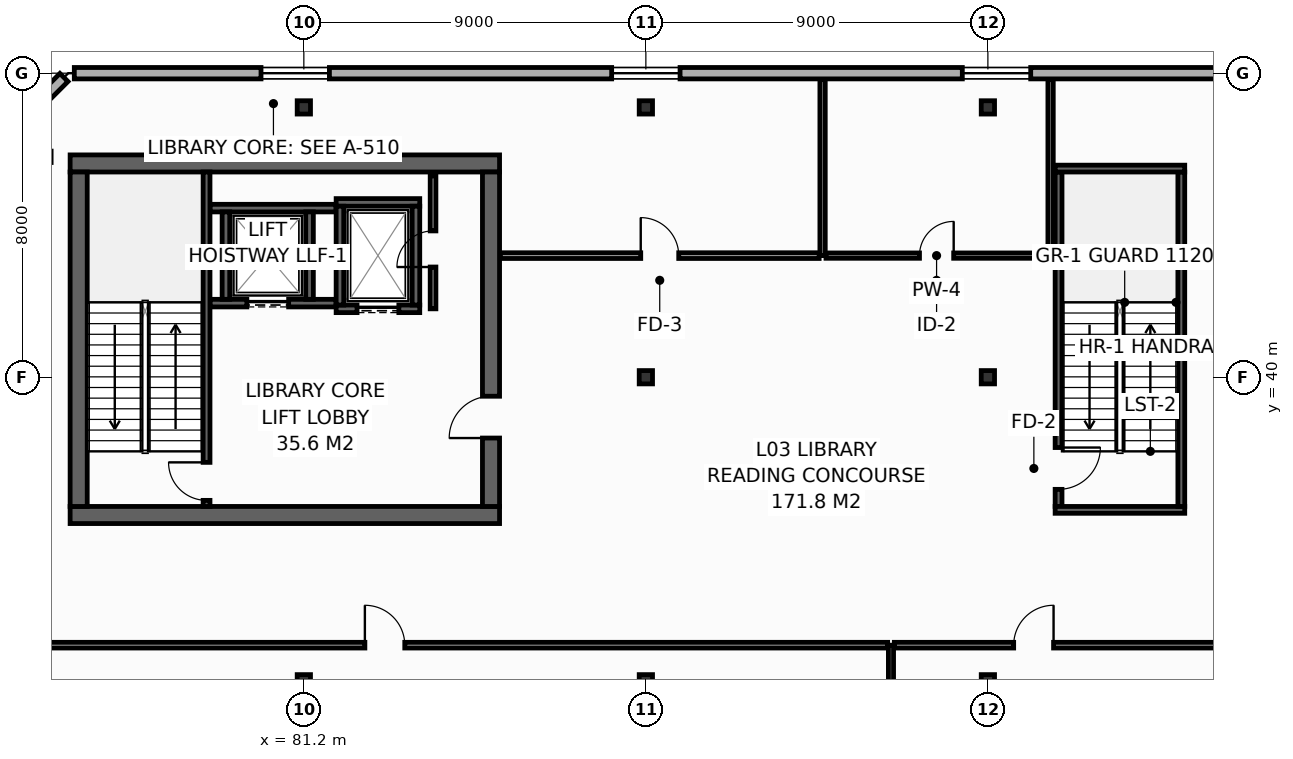
"""IFC4 building model, lengths in metres.
Left out: names, types, materials, properties, quantities, classifications, styles, units other than length and angle.
Written with IfcOpenShell. Run it as: python <this file> out.ifc"""

import sys

from ifc_helpers import new_model, si_unit, direction, frame, frame_2d, origin, origin_2d, place, context, subcontext, project, spatial, rectangle, i_section, extrude, element, fill, save


model = new_model("IFC4")
c1 = context("Model", 3, precision=1e-05, world=origin(), true_north=direction((0.0, 1.0)))
c2 = subcontext(c1, "Body", "Model", "MODEL_VIEW")
j1 = project(units=[si_unit("LENGTHUNIT", "METRE"), si_unit("PLANEANGLEUNIT", "RADIAN")], contexts=[c1])
p1 = place(None, origin())
s1 = spatial("IfcSite", under=j1, at=p1, CompositionType="ELEMENT")
p2 = place(p1, origin())
s2 = spatial("IfcBuilding", under=s1, at=p2, CompositionType="ELEMENT")
p3 = place(p2, frame((0.0, 0.0, 16.8)))
s3 = spatial("IfcBuildingStorey", under=s2, at=p3, CompositionType="ELEMENT", Elevation=16.8)
for number, where, z_axis, x_axis in (
    (1, (75.05, 36.375, 0.0), (0.0, 0.0, 1.0), (1.0, 0.0, 0.0)),
    (2, (75.05, 45.625, 0.0), (0.0, 0.0, 1.0), (1.0, 0.0, 0.0)),
):
    element("IfcWall", number, at=place(p3, frame(where, z_axis=z_axis, x_axis=x_axis)), inside=s3, PredefinedType="SHEAR", context=c2, shape_type="SweptSolid", body=[
        extrude(rectangle(XDim=11.3, YDim=0.45, at=frame_2d((5.65, 0.0))), origin(), (0.0, 0.0, 1.0), 5.1),
    ])
p4 = place(p3, frame((75.275, 36.6, 0.0), z_axis=(0.0, 0.0, 1.0), x_axis=(0.0, 1.0, 0.0)))
e3 = element("IfcWall", 3, at=p4, inside=s3, PredefinedType="SHEAR", context=c2, shape_type="SweptSolid", body=[
    extrude(rectangle(XDim=8.8, YDim=0.45, at=frame_2d((4.4, 0.0))), origin(), (0.0, 0.0, 1.0), 5.1),
])
p5 = place(p3, frame((86.125, 36.6, 0.0), z_axis=(0.0, 0.0, 1.0), x_axis=(0.0, 1.0, 0.0)))
e4 = element("IfcWall", 4, at=p5, inside=s3, PredefinedType="SHEAR", context=c2, shape_type="SweptSolid", body=[
    extrude(rectangle(XDim=8.8, YDim=0.45, at=frame_2d((4.4, 0.0))), origin(), (0.0, 0.0, 1.0), 5.1),
])
p6 = place(p5, frame((1.8, 0.0, 0.0)))
e5 = element("IfcOpeningElement", 5, at=p6, cuts=e4, PredefinedType="OPENING", context=c2, shape_type="SweptSolid", body=[
    extrude(rectangle(XDim=1.1, YDim=2.15, at=frame_2d((0.55, 1.075))), frame((0.0, 0.235, 0.0), z_axis=(0.0, -1.0, 0.0), x_axis=(1.0, 0.0, 0.0)), (0.0, 0.0, 1.0), 0.47),
])
for number, where, z_axis, x_axis in (
    (6, (81.2, 32.0, 0.0), (0.0, 0.0, 1.0), (1.0, 0.0, 0.0)),
    (7, (81.2, 47.1, 0.0), (0.0, 0.0, 1.0), (1.0, 0.0, 0.0)),
    (8, (90.2, 32.0, 0.0), (0.0, 0.0, 1.0), (1.0, 0.0, 0.0)),
    (9, (90.2, 40.0, 0.0), (0.0, 0.0, 1.0), (1.0, 0.0, 0.0)),
    (10, (90.2, 47.1, 0.0), (0.0, 0.0, 1.0), (1.0, 0.0, 0.0)),
    (11, (99.2, 32.0, 0.0), (0.0, 0.0, 1.0), (1.0, 0.0, 0.0)),
    (12, (99.2, 40.0, 0.0), (0.0, 0.0, 1.0), (1.0, 0.0, 0.0)),
    (13, (99.2, 47.1, 0.0), (0.0, 0.0, 1.0), (1.0, 0.0, 0.0)),
):
    element("IfcColumn", number, at=place(p3, frame(where, z_axis=z_axis, x_axis=x_axis)), inside=s3, PredefinedType="COLUMN", context=c2, shape_type="SweptSolid", body=[
        extrude(i_section(OverallWidth=0.35, OverallDepth=0.35, WebThickness=0.012, FlangeThickness=0.019, FilletRadius=0.02, at=origin_2d()), origin(), (0.0, 0.0, 1.0), 5.4),
    ])
p7 = place(p3, frame((78.73, 41.95, 0.0), z_axis=(0.0, 0.0, 1.0), x_axis=(1.0, 0.0, 0.0)))
e14 = element("IfcWall", 14, at=p7, inside=s3, PredefinedType="SHEAR", context=c2, shape_type="SweptSolid", body=[
    extrude(rectangle(XDim=3.32, YDim=0.2, at=frame_2d((1.66, 0.0))), origin(), (0.0, 0.0, 1.0), 5.1),
])
p8 = place(p7, frame((0.97, 0.0, 0.0)))
e15 = element("IfcOpeningElement", 15, at=p8, cuts=e14, PredefinedType="OPENING", context=c2, shape_type="SweptSolid", body=[
    extrude(rectangle(XDim=1.1, YDim=2.2, at=frame_2d((0.55, 1.1))), frame((0.0, 0.11, 0.0), z_axis=(0.0, -1.0, 0.0), x_axis=(1.0, 0.0, 0.0)), (0.0, 0.0, 1.0), 0.22),
])
p9 = place(p3, frame((78.73, 44.45, 0.0), z_axis=(0.0, 0.0, 1.0), x_axis=(1.0, 0.0, 0.0)))
e16 = element("IfcWall", 16, at=p9, inside=s3, PredefinedType="SHEAR", context=c2, shape_type="SweptSolid", body=[
    extrude(rectangle(XDim=3.32, YDim=0.2, at=frame_2d((1.66, 0.0))), origin(), (0.0, 0.0, 1.0), 5.1),
])
for number, where, z_axis, x_axis in (
    (17, (79.15, 42.05, 0.0), (0.0, 0.0, 1.0), (0.0, 1.0, 0.0)),
    (18, (81.35, 42.05, 0.0), (0.0, 0.0, 1.0), (0.0, 1.0, 0.0)),
):
    element("IfcWall", number, at=place(p3, frame(where, z_axis=z_axis, x_axis=x_axis)), inside=s3, PredefinedType="SHEAR", context=c2, shape_type="SweptSolid", body=[
        extrude(rectangle(XDim=2.3, YDim=0.2, at=frame_2d((1.15, 0.0))), origin(), (0.0, 0.0, 1.0), 5.1),
    ])
p10 = place(p3, frame((82.05, 41.8, 0.0), z_axis=(0.0, 0.0, 1.0), x_axis=(1.0, 0.0, 0.0)))
e19 = element("IfcWall", 19, at=p10, inside=s3, PredefinedType="SHEAR", context=c2, shape_type="SweptSolid", body=[
    extrude(rectangle(XDim=2.2, YDim=0.2, at=frame_2d((1.1, 0.0))), origin(), (0.0, 0.0, 1.0), 5.1),
])
p11 = place(p10, frame((0.55, 0.0, 0.0)))
e20 = element("IfcOpeningElement", 20, at=p11, cuts=e19, PredefinedType="OPENING", context=c2, shape_type="SweptSolid", body=[
    extrude(rectangle(XDim=1.1, YDim=2.2, at=frame_2d((0.55, 1.1))), frame((0.0, 0.11, 0.0), z_axis=(0.0, -1.0, 0.0), x_axis=(1.0, 0.0, 0.0)), (0.0, 0.0, 1.0), 0.22),
])
p12 = place(p3, frame((82.05, 44.6, 0.0), z_axis=(0.0, 0.0, 1.0), x_axis=(1.0, 0.0, 0.0)))
e21 = element("IfcWall", 21, at=p12, inside=s3, PredefinedType="SHEAR", context=c2, shape_type="SweptSolid", body=[
    extrude(rectangle(XDim=2.2, YDim=0.2, at=frame_2d((1.1, 0.0))), origin(), (0.0, 0.0, 1.0), 5.1),
])
for number, where, z_axis, x_axis in (
    (22, (82.15, 41.9, 0.0), (0.0, 0.0, 1.0), (0.0, 1.0, 0.0)),
    (23, (84.15, 41.9, 0.0), (0.0, 0.0, 1.0), (0.0, 1.0, 0.0)),
):
    element("IfcWall", number, at=place(p3, frame(where, z_axis=z_axis, x_axis=x_axis)), inside=s3, PredefinedType="SHEAR", context=c2, shape_type="SweptSolid", body=[
        extrude(rectangle(XDim=2.6, YDim=0.2, at=frame_2d((1.3, 0.0))), origin(), (0.0, 0.0, 1.0), 5.1),
    ])
p13 = place(p3, frame((78.64, 36.6, 0.0), z_axis=(0.0, 0.0, 1.0), x_axis=(0.0, 1.0, 0.0)))
e24 = element("IfcWall", 24, at=p13, inside=s3, PredefinedType="SHEAR", context=c2, shape_type="SweptSolid", body=[
    extrude(rectangle(XDim=8.8, YDim=0.18, at=frame_2d((4.4, 0.0))), origin(), (0.0, 0.0, 1.0), 5.1),
])
p14 = place(p13, frame((0.16, 0.0, 0.0)))
e25 = element("IfcOpeningElement", 25, at=p14, cuts=e24, PredefinedType="OPENING", context=c2, shape_type="SweptSolid", body=[
    extrude(rectangle(XDim=1.0, YDim=2.15, at=frame_2d((0.5, 1.075))), frame((0.0, 0.1, 0.0), z_axis=(0.0, -1.0, 0.0), x_axis=(1.0, 0.0, 0.0)), (0.0, 0.0, 1.0), 0.2),
])
p15 = place(p3, frame((101.06, 45.4, 0.0), z_axis=(0.0, 0.0, 1.0), x_axis=(0.0, -1.0, 0.0)))
e26 = element("IfcWall", 26, at=p15, inside=s3, PredefinedType="SHEAR", context=c2, shape_type="SweptSolid", body=[
    extrude(rectangle(XDim=8.8, YDim=0.18, at=frame_2d((4.4, 0.0))), origin(), (0.0, 0.0, 1.0), 5.1),
])
p16 = place(p15, frame((7.25, 0.0, 0.0)))
e27 = element("IfcOpeningElement", 27, at=p16, cuts=e26, PredefinedType="OPENING", context=c2, shape_type="SweptSolid", body=[
    extrude(rectangle(XDim=1.1, YDim=2.15, at=frame_2d((0.55, 1.075))), frame((0.0, 0.1, 0.0), z_axis=(0.0, -1.0, 0.0), x_axis=(1.0, 0.0, 0.0)), (0.0, 0.0, 1.0), 0.2),
])
p17 = place(p3, frame((100.97, 36.51, 0.0), z_axis=(0.0, 0.0, 1.0), x_axis=(1.0, 0.0, 0.0)))
e28 = element("IfcWall", 28, at=p17, inside=s3, PredefinedType="SHEAR", context=c2, shape_type="SweptSolid", body=[
    extrude(rectangle(XDim=3.41, YDim=0.18, at=frame_2d((1.705, 0.0))), origin(), (0.0, 0.0, 1.0), 5.1),
])
p18 = place(p3, frame((104.29, 36.6, 0.0), z_axis=(0.0, 0.0, 1.0), x_axis=(0.0, 1.0, 0.0)))
e29 = element("IfcWall", 29, at=p18, inside=s3, PredefinedType="SHEAR", context=c2, shape_type="SweptSolid", body=[
    extrude(rectangle(XDim=8.8, YDim=0.18, at=frame_2d((4.4, 0.0))), origin(), (0.0, 0.0, 1.0), 5.1),
])
p19 = place(p3, frame((104.38, 45.49, 0.0), z_axis=(0.0, 0.0, 1.0), x_axis=(-1.0, 0.0, 0.0)))
e30 = element("IfcWall", 30, at=p19, inside=s3, PredefinedType="SHEAR", context=c2, shape_type="SweptSolid", body=[
    extrude(rectangle(XDim=3.41, YDim=0.18, at=frame_2d((1.705, 0.0))), origin(), (0.0, 0.0, 1.0), 5.1),
])
p20 = place(p3, frame((84.6, 41.8, 0.0), z_axis=(0.0, 0.0, 1.0), x_axis=(0.0, 1.0, 0.0)))
e31 = element("IfcWall", 31, at=p20, inside=s3, PredefinedType="PARTITIONING", context=c2, shape_type="SweptSolid", body=[
    extrude(rectangle(XDim=3.5, YDim=0.15, at=frame_2d((1.75, 0.0))), origin(), (0.0, 0.0, 1.0), 5.1),
])
p21 = place(p20, frame((1.1, 0.0, 0.0)))
e32 = element("IfcOpeningElement", 32, at=p21, cuts=e31, PredefinedType="OPENING", context=c2, shape_type="SweptSolid", body=[
    extrude(rectangle(XDim=0.95, YDim=2.15, at=frame_2d((0.475, 1.075))), frame((0.0, 0.085, 0.0), z_axis=(0.0, -1.0, 0.0), x_axis=(1.0, 0.0, 0.0)), (0.0, 0.0, 1.0), 0.17),
])
p22 = place(p3, frame((105.24, 48.0, 0.0), z_axis=(0.0, 0.0, 1.0), x_axis=(-1.0, 0.0, 0.0)))
e33 = element("IfcWall", 33, at=p22, inside=s3, PredefinedType="STANDARD", context=c2, shape_type="SweptSolid", body=[
    extrude(rectangle(XDim=30.08, YDim=0.3, at=frame_2d((15.04, 0.0))), origin(), (0.0, 0.0, 1.0), 5.1),
])
p23 = place(p22, frame((4.913, 0.0, 0.9)))
e34 = element("IfcOpeningElement", 34, at=p23, cuts=e33, PredefinedType="OPENING", context=c2, shape_type="SweptSolid", body=[
    extrude(rectangle(XDim=1.8, YDim=2.5, at=frame_2d((0.9, 1.25))), frame((0.0, 0.16, 0.0), z_axis=(0.0, -1.0, 0.0), x_axis=(1.0, 0.0, 0.0)), (0.0, 0.0, 1.0), 0.32),
])
p24 = place(p22, frame((14.14, 0.0, 0.9)))
e35 = element("IfcOpeningElement", 35, at=p24, cuts=e33, PredefinedType="OPENING", context=c2, shape_type="SweptSolid", body=[
    extrude(rectangle(XDim=1.8, YDim=2.5, at=frame_2d((0.9, 1.25))), frame((0.0, 0.16, 0.0), z_axis=(0.0, -1.0, 0.0), x_axis=(1.0, 0.0, 0.0)), (0.0, 0.0, 1.0), 0.32),
])
p25 = place(p22, frame((23.367, 0.0, 0.9)))
e36 = element("IfcOpeningElement", 36, at=p25, cuts=e33, PredefinedType="OPENING", context=c2, shape_type="SweptSolid", body=[
    extrude(rectangle(XDim=1.8, YDim=2.5, at=frame_2d((0.9, 1.25))), frame((0.0, 0.16, 0.0), z_axis=(0.0, -1.0, 0.0), x_axis=(1.0, 0.0, 0.0)), (0.0, 0.0, 1.0), 0.32),
])
p26 = place(p3, frame((74.887, 47.887, 0.0), z_axis=(0.0, 0.0, 1.0), x_axis=(-0.707106781187, -0.707106781187, 0.0)))
e37 = element("IfcWall", 37, at=p26, inside=s3, PredefinedType="STANDARD", context=c2, shape_type="SweptSolid", body=[
    extrude(rectangle(XDim=3.64, YDim=0.3, at=frame_2d((1.82, 0.0))), origin(), (0.0, 0.0, 1.0), 5.1),
])
p27 = place(p3, frame((96.65, 28.18, 0.0), z_axis=(0.0, 0.0, 1.0), x_axis=(0.0, 1.0, 0.0)))
e38 = element("IfcWall", 38, at=p27, inside=s3, PredefinedType="PARTITIONING", context=c2, shape_type="SweptSolid", body=[
    extrude(rectangle(XDim=4.77, YDim=0.135, at=frame_2d((2.385, 0.0))), origin(), (0.0, 0.0, 1.0), 4.385),
])
p28 = place(p3, frame((72.3, 32.95, 0.0), z_axis=(0.0, 0.0, 1.0), x_axis=(1.0, 0.0, 0.0)))
e39 = element("IfcWall", 39, at=p28, inside=s3, PredefinedType="PARTITIONING", context=c2, shape_type="SweptSolid", body=[
    extrude(rectangle(XDim=24.262, YDim=0.15, at=frame_2d((12.131, 0.0))), origin(), (0.0, 0.0, 1.0), 4.385),
])
p29 = place(p28, frame((10.506, 0.0, 0.0)))
e40 = element("IfcOpeningElement", 40, at=p29, cuts=e39, PredefinedType="OPENING", context=c2, shape_type="SweptSolid", body=[
    extrude(rectangle(XDim=1.05, YDim=2.15, at=frame_2d((0.525, 1.075))), frame((0.0, 0.085, 0.0), z_axis=(0.0, -1.0, 0.0), x_axis=(1.0, 0.0, 0.0)), (0.0, 0.0, 1.0), 0.17),
])
p30 = place(p3, frame((96.738, 32.95, 0.0), z_axis=(0.0, 0.0, 1.0), x_axis=(1.0, 0.0, 0.0)))
e41 = element("IfcWall", 41, at=p30, inside=s3, PredefinedType="PARTITIONING", context=c2, shape_type="SweptSolid", body=[
    extrude(rectangle(XDim=11.292, YDim=0.15, at=frame_2d((5.646, 0.0))), origin(), (0.0, 0.0, 1.0), 4.385),
])
p31 = place(p30, frame((3.141, 0.0, 0.0)))
e42 = element("IfcOpeningElement", 42, at=p31, cuts=e41, PredefinedType="OPENING", context=c2, shape_type="SweptSolid", body=[
    extrude(rectangle(XDim=1.05, YDim=2.15, at=frame_2d((0.525, 1.075))), frame((0.0, 0.085, 0.0), z_axis=(0.0, -1.0, 0.0), x_axis=(1.0, 0.0, 0.0)), (0.0, 0.0, 1.0), 0.17),
])
p32 = place(p3, frame((94.85, 43.2, 0.0), z_axis=(0.0, 0.0, 1.0), x_axis=(0.0, 1.0, 0.0)))
e43 = element("IfcWall", 43, at=p32, inside=s3, PredefinedType="PARTITIONING", context=c2, shape_type="SweptSolid", body=[
    extrude(rectangle(XDim=4.63, YDim=0.14, at=frame_2d((2.315, 0.0))), origin(), (0.0, 0.0, 1.0), 4.385),
])
p33 = place(p3, frame((100.85, 43.2, 0.0), z_axis=(0.0, 0.0, 1.0), x_axis=(0.0, 1.0, 0.0)))
e44 = element("IfcWall", 44, at=p33, inside=s3, PredefinedType="PARTITIONING", context=c2, shape_type="SweptSolid", body=[
    extrude(rectangle(XDim=4.63, YDim=0.14, at=frame_2d((2.315, 0.0))), origin(), (0.0, 0.0, 1.0), 5.1),
])
p34 = place(p3, frame((86.37, 43.2, 0.0), z_axis=(0.0, 0.0, 1.0), x_axis=(1.0, 0.0, 0.0)))
e45 = element("IfcWall", 45, at=p34, inside=s3, PredefinedType="PARTITIONING", context=c2, shape_type="SweptSolid", body=[
    extrude(rectangle(XDim=8.39, YDim=0.15, at=frame_2d((4.195, 0.0))), origin(), (0.0, 0.0, 1.0), 4.385),
])
p35 = place(p34, frame((3.695, 0.0, 0.0)))
e46 = element("IfcOpeningElement", 46, at=p35, cuts=e45, PredefinedType="OPENING", context=c2, shape_type="SweptSolid", body=[
    extrude(rectangle(XDim=1.0, YDim=2.15, at=frame_2d((0.5, 1.075))), frame((0.0, 0.085, 0.0), z_axis=(0.0, -1.0, 0.0), x_axis=(1.0, 0.0, 0.0)), (0.0, 0.0, 1.0), 0.17),
])
p36 = place(p3, frame((94.94, 43.2, 0.0), z_axis=(0.0, 0.0, 1.0), x_axis=(1.0, 0.0, 0.0)))
e47 = element("IfcWall", 47, at=p36, inside=s3, PredefinedType="PARTITIONING", context=c2, shape_type="SweptSolid", body=[
    extrude(rectangle(XDim=5.82, YDim=0.14, at=frame_2d((2.91, 0.0))), origin(), (0.0, 0.0, 1.0), 4.385),
])
p37 = place(p36, frame((2.46, 0.0, 0.0)))
e48 = element("IfcOpeningElement", 48, at=p37, cuts=e47, PredefinedType="OPENING", context=c2, shape_type="SweptSolid", body=[
    extrude(rectangle(XDim=0.9, YDim=2.1, at=frame_2d((0.45, 1.05))), frame((0.0, 0.08, 0.0), z_axis=(0.0, -1.0, 0.0), x_axis=(1.0, 0.0, 0.0)), (0.0, 0.0, 1.0), 0.16),
])
p38 = place(p8, origin())
e49 = element("IfcDoor", 49, at=p38, inside=s3, OperationType="SLIDING_TO_LEFT", PredefinedType="DOOR", context=c2, shape_type="SweptSolid", body=[
    extrude(rectangle(XDim=1.1, YDim=2.2, at=frame_2d((0.55, 1.1))), frame((0.0, 0.025, 0.0), z_axis=(0.0, -1.0, 0.0), x_axis=(1.0, 0.0, 0.0)), (0.0, 0.0, 1.0), 0.05),
])
fill(e15, e49)
p39 = place(p11, origin())
e50 = element("IfcDoor", 50, at=p39, inside=s3, OperationType="SLIDING_TO_LEFT", PredefinedType="DOOR", context=c2, shape_type="SweptSolid", body=[
    extrude(rectangle(XDim=1.1, YDim=2.2, at=frame_2d((0.55, 1.1))), frame((0.0, 0.025, 0.0), z_axis=(0.0, -1.0, 0.0), x_axis=(1.0, 0.0, 0.0)), (0.0, 0.0, 1.0), 0.05),
])
fill(e20, e50)
p40 = place(p14, origin())
e51 = element("IfcDoor", 51, at=p40, inside=s3, OperationType="SINGLE_SWING_RIGHT", PredefinedType="DOOR", context=c2, shape_type="SweptSolid", body=[
    extrude(rectangle(XDim=1.0, YDim=2.15, at=frame_2d((0.5, 1.075))), frame((0.0, 0.025, 0.0), z_axis=(0.0, -1.0, 0.0), x_axis=(1.0, 0.0, 0.0)), (0.0, 0.0, 1.0), 0.05),
])
fill(e25, e51)
p41 = place(p16, origin())
e52 = element("IfcDoor", 52, at=p41, inside=s3, OperationType="SINGLE_SWING_LEFT", PredefinedType="DOOR", context=c2, shape_type="SweptSolid", body=[
    extrude(rectangle(XDim=1.1, YDim=2.15, at=frame_2d((0.55, 1.075))), frame((0.0, 0.025, 0.0), z_axis=(0.0, -1.0, 0.0), x_axis=(1.0, 0.0, 0.0)), (0.0, 0.0, 1.0), 0.05),
])
fill(e27, e52)
p42 = place(p6, origin())
e53 = element("IfcDoor", 53, at=p42, inside=s3, OperationType="SINGLE_SWING_LEFT", PredefinedType="DOOR", context=c2, shape_type="SweptSolid", body=[
    extrude(rectangle(XDim=1.1, YDim=2.15, at=frame_2d((0.55, 1.075))), frame((0.0, 0.025, 0.0), z_axis=(0.0, -1.0, 0.0), x_axis=(1.0, 0.0, 0.0)), (0.0, 0.0, 1.0), 0.05),
])
fill(e5, e53)
p43 = place(p21, origin())
e54 = element("IfcDoor", 54, at=p43, inside=s3, OperationType="SINGLE_SWING_LEFT", PredefinedType="DOOR", context=c2, shape_type="SweptSolid", body=[
    extrude(rectangle(XDim=0.95, YDim=2.15, at=frame_2d((0.475, 1.075))), frame((0.0, 0.025, 0.0), z_axis=(0.0, -1.0, 0.0), x_axis=(1.0, 0.0, 0.0)), (0.0, 0.0, 1.0), 0.05),
])
fill(e32, e54)
p44 = place(p23, origin())
e55 = element("IfcWindow", 55, at=p44, inside=s3, PartitioningType="DOUBLE_PANEL_VERTICAL", PredefinedType="WINDOW", context=c2, shape_type="SweptSolid", body=[
    extrude(rectangle(XDim=1.8, YDim=2.5, at=frame_2d((0.9, 1.25))), frame((0.0, 0.03, 0.0), z_axis=(0.0, -1.0, 0.0), x_axis=(1.0, 0.0, 0.0)), (0.0, 0.0, 1.0), 0.06),
])
fill(e34, e55)
p45 = place(p24, origin())
e56 = element("IfcWindow", 56, at=p45, inside=s3, PartitioningType="DOUBLE_PANEL_VERTICAL", PredefinedType="WINDOW", context=c2, shape_type="SweptSolid", body=[
    extrude(rectangle(XDim=1.8, YDim=2.5, at=frame_2d((0.9, 1.25))), frame((0.0, 0.03, 0.0), z_axis=(0.0, -1.0, 0.0), x_axis=(1.0, 0.0, 0.0)), (0.0, 0.0, 1.0), 0.06),
])
fill(e35, e56)
p46 = place(p25, origin())
e57 = element("IfcWindow", 57, at=p46, inside=s3, PartitioningType="DOUBLE_PANEL_VERTICAL", PredefinedType="WINDOW", context=c2, shape_type="SweptSolid", body=[
    extrude(rectangle(XDim=1.8, YDim=2.5, at=frame_2d((0.9, 1.25))), frame((0.0, 0.03, 0.0), z_axis=(0.0, -1.0, 0.0), x_axis=(1.0, 0.0, 0.0)), (0.0, 0.0, 1.0), 0.06),
])
fill(e36, e57)
p47 = place(p29, origin())
e58 = element("IfcDoor", 58, at=p47, inside=s3, OperationType="SINGLE_SWING_LEFT", PredefinedType="DOOR", context=c2, shape_type="SweptSolid", body=[
    extrude(rectangle(XDim=1.05, YDim=2.15, at=frame_2d((0.525, 1.075))), frame((0.0, 0.025, 0.0), z_axis=(0.0, -1.0, 0.0), x_axis=(1.0, 0.0, 0.0)), (0.0, 0.0, 1.0), 0.05),
])
fill(e40, e58)
p48 = place(p31, origin())
e59 = element("IfcDoor", 59, at=p48, inside=s3, OperationType="SINGLE_SWING_RIGHT", PredefinedType="DOOR", context=c2, shape_type="SweptSolid", body=[
    extrude(rectangle(XDim=1.05, YDim=2.15, at=frame_2d((0.525, 1.075))), frame((0.0, 0.025, 0.0), z_axis=(0.0, -1.0, 0.0), x_axis=(1.0, 0.0, 0.0)), (0.0, 0.0, 1.0), 0.05),
])
fill(e42, e59)
p49 = place(p35, origin())
e60 = element("IfcDoor", 60, at=p49, inside=s3, OperationType="SINGLE_SWING_LEFT", PredefinedType="DOOR", context=c2, shape_type="SweptSolid", body=[
    extrude(rectangle(XDim=1.0, YDim=2.15, at=frame_2d((0.5, 1.075))), frame((0.0, 0.025, 0.0), z_axis=(0.0, -1.0, 0.0), x_axis=(1.0, 0.0, 0.0)), (0.0, 0.0, 1.0), 0.05),
])
fill(e46, e60)
p50 = place(p37, origin())
e61 = element("IfcDoor", 61, at=p50, inside=s3, OperationType="SINGLE_SWING_RIGHT", PredefinedType="DOOR", context=c2, shape_type="SweptSolid", body=[
    extrude(rectangle(XDim=0.9, YDim=2.1, at=frame_2d((0.45, 1.05))), frame((0.0, 0.025, 0.0), z_axis=(0.0, -1.0, 0.0), x_axis=(1.0, 0.0, 0.0)), (0.0, 0.0, 1.0), 0.05),
])
fill(e48, e61)
save(model, sys.argv[1])
